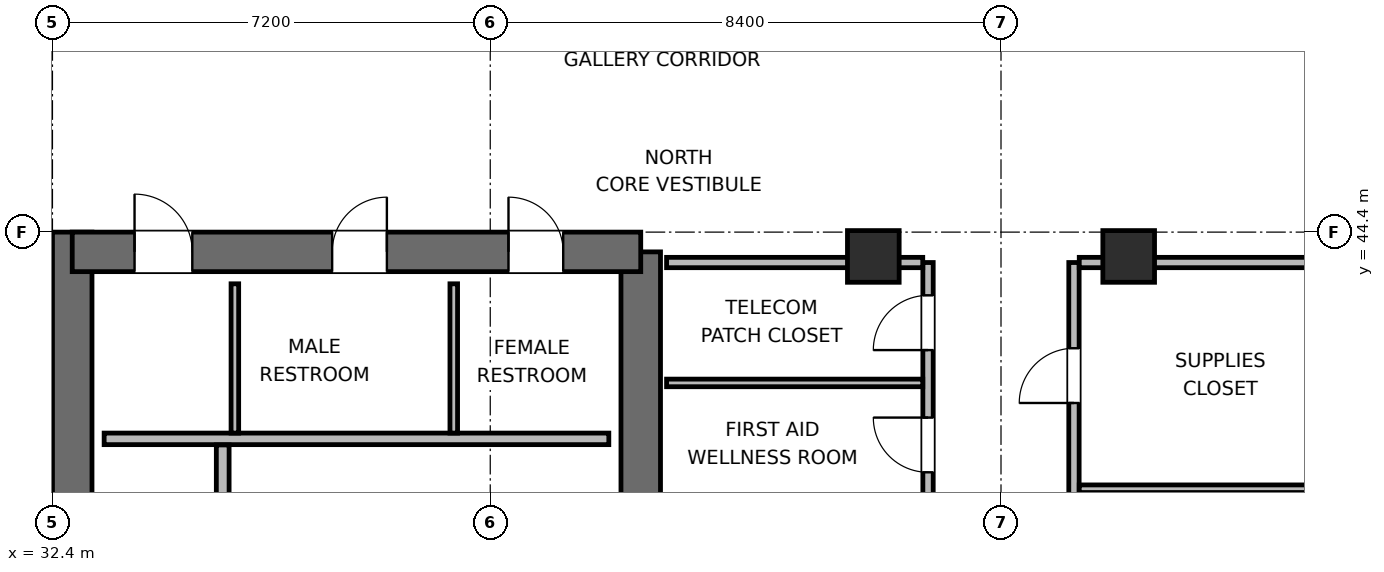
"""IFC4 building model, lengths in metres.
Left out: names, types, materials, properties, quantities, classifications, styles, units other than length and angle.
Written with IfcOpenShell. Run it as: python <this file> out.ifc"""

import sys

from ifc_helpers import new_model, si_unit, direction, frame, frame_2d, origin, origin_2d, place, context, subcontext, project, spatial, rectangle, extrude, element, fill, save


model = new_model("IFC4")
c1 = context("Model", 3, precision=1e-05, world=origin(), true_north=direction((0.0, 1.0)))
c2 = subcontext(c1, "Body", "Model", "MODEL_VIEW")
j1 = project(units=[si_unit("LENGTHUNIT", "METRE"), si_unit("PLANEANGLEUNIT", "RADIAN")], contexts=[c1])
p1 = place(None, origin())
s1 = spatial("IfcSite", under=j1, at=p1, CompositionType="ELEMENT")
p2 = place(p1, origin())
s2 = spatial("IfcBuilding", under=s1, at=p2, CompositionType="ELEMENT")
p3 = place(p2, frame((0.0, 0.0, 219.3)))
s3 = spatial("IfcBuildingStorey", under=s2, at=p3, CompositionType="ELEMENT", Elevation=219.3)
p4 = place(p3, frame((32.725, 27.6, 0.0), z_axis=(0.0, 0.0, 1.0), x_axis=(0.0, 1.0, 0.0)))
e1 = element("IfcWall", 1, at=p4, inside=s3, PredefinedType="SHEAR", context=c2, shape_type="SweptSolid", body=[
    extrude(rectangle(XDim=16.8, YDim=0.65, at=frame_2d((8.4, 0.0))), origin(), (0.0, 0.0, 1.0), 3.9),
])
p5 = place(p3, frame((42.075, 37.8, 0.0), z_axis=(0.0, 0.0, 1.0), x_axis=(0.0, 1.0, 0.0)))
e2 = element("IfcWall", 2, at=p5, inside=s3, PredefinedType="SHEAR", context=c2, shape_type="SweptSolid", body=[
    extrude(rectangle(XDim=6.275, YDim=0.65, at=frame_2d((3.137, 0.0))), origin(), (0.0, 0.0, 1.0), 3.9),
])
p6 = place(p3, frame((32.725, 44.075, 0.0), z_axis=(0.0, 0.0, 1.0), x_axis=(1.0, 0.0, 0.0)))
e3 = element("IfcWall", 3, at=p6, inside=s3, PredefinedType="SHEAR", context=c2, shape_type="SweptSolid", body=[
    extrude(rectangle(XDim=9.35, YDim=0.65, at=frame_2d((4.675, 0.0))), origin(), (0.0, 0.0, 1.0), 3.9),
])
p7 = place(p6, frame((1.025, 0.0, 0.0)))
e4 = element("IfcOpeningElement", 4, at=p7, cuts=e3, PredefinedType="OPENING", context=c2, shape_type="SweptSolid", body=[
    extrude(rectangle(XDim=0.95, YDim=2.04, at=frame_2d((0.475, 1.02))), frame((0.0, 0.335, 0.0), z_axis=(0.0, -1.0, 0.0), x_axis=(1.0, 0.0, 0.0)), (0.0, 0.0, 1.0), 0.67),
])
p8 = place(p6, frame((4.275, 0.0, 0.0)))
e5 = element("IfcOpeningElement", 5, at=p8, cuts=e3, PredefinedType="OPENING", context=c2, shape_type="SweptSolid", body=[
    extrude(rectangle(XDim=0.9, YDim=2.02, at=frame_2d((0.45, 1.01))), frame((0.0, 0.335, 0.0), z_axis=(0.0, -1.0, 0.0), x_axis=(1.0, 0.0, 0.0)), (0.0, 0.0, 1.0), 0.67),
])
p9 = place(p6, frame((7.175, 0.0, 0.0)))
e6 = element("IfcOpeningElement", 6, at=p9, cuts=e3, PredefinedType="OPENING", context=c2, shape_type="SweptSolid", body=[
    extrude(rectangle(XDim=0.9, YDim=2.02, at=frame_2d((0.45, 1.01))), frame((0.0, 0.335, 0.0), z_axis=(0.0, -1.0, 0.0), x_axis=(1.0, 0.0, 0.0)), (0.0, 0.0, 1.0), 0.67),
])
for number, where, z_axis, x_axis in (
    (7, (45.9, 44.0, 0.0), (0.0, 0.0, 1.0), (1.0, 0.0, 0.0)),
    (8, (50.1, 44.0, 0.0), (0.0, 0.0, 1.0), (1.0, 0.0, 0.0)),
):
    element("IfcColumn", number, at=place(p3, frame(where, z_axis=z_axis, x_axis=x_axis)), inside=s3, PredefinedType="COLUMN", context=c2, shape_type="SweptSolid", body=[
        extrude(rectangle(XDim=0.85, YDim=0.85, at=origin_2d()), origin(), (0.0, 0.0, 1.0), 3.9),
    ])
p10 = place(p3, frame((33.25, 41.0, 0.0), z_axis=(0.0, 0.0, 1.0), x_axis=(1.0, 0.0, 0.0)))
e9 = element("IfcWall", 9, at=p10, inside=s3, PredefinedType="PLUMBINGWALL", context=c2, shape_type="SweptSolid", body=[
    extrude(rectangle(XDim=8.3, YDim=0.19, at=frame_2d((4.15, 0.0))), origin(), (0.0, 0.0, 1.0), 3.68),
])
for number, where, z_axis, x_axis in (
    (10, (35.4, 41.095, 0.0), (0.0, 0.0, 1.0), (0.0, 1.0, 0.0)),
    (11, (39.0, 41.095, 0.0), (0.0, 0.0, 1.0), (0.0, 1.0, 0.0)),
):
    element("IfcWall", number, at=place(p3, frame(where, z_axis=z_axis, x_axis=x_axis)), inside=s3, PredefinedType="PARTITIONING", context=c2, shape_type="SweptSolid", body=[
        extrude(rectangle(XDim=2.455, YDim=0.125, at=frame_2d((1.228, 0.0))), origin(), (0.0, 0.0, 1.0), 3.68),
    ])
p11 = place(p3, frame((35.2, 39.58, 0.0), z_axis=(0.0, 0.0, 1.0), x_axis=(0.0, 1.0, 0.0)))
e12 = element("IfcWall", 12, at=p11, inside=s3, PredefinedType="PARTITIONING", context=c2, shape_type="SweptSolid", body=[
    extrude(rectangle(XDim=1.32, YDim=0.21, at=frame_2d((0.66, 0.0))), origin(), (0.0, 0.0, 1.0), 3.68),
])
p12 = place(p3, frame((46.8, 37.9, 0.0), z_axis=(0.0, 0.0, 1.0), x_axis=(0.0, 1.0, 0.0)))
e13 = element("IfcWall", 13, at=p12, inside=s3, PredefinedType="PARTITIONING", context=c2, shape_type="SweptSolid", body=[
    extrude(rectangle(XDim=6.0, YDim=0.17, at=frame_2d((3.0, 0.0))), origin(), (0.0, 0.0, 1.0), 3.68),
])
p13 = place(p12, frame((0.54, 0.0, 0.0)))
e14 = element("IfcOpeningElement", 14, at=p13, cuts=e13, PredefinedType="OPENING", context=c2, shape_type="SweptSolid", body=[
    extrude(rectangle(XDim=0.9, YDim=2.02, at=frame_2d((0.45, 1.01))), frame((0.0, 0.095, 0.0), z_axis=(0.0, -1.0, 0.0), x_axis=(1.0, 0.0, 0.0)), (0.0, 0.0, 1.0), 0.19),
])
p14 = place(p12, frame((2.55, 0.0, 0.0)))
e15 = element("IfcOpeningElement", 15, at=p14, cuts=e13, PredefinedType="OPENING", context=c2, shape_type="SweptSolid", body=[
    extrude(rectangle(XDim=0.9, YDim=2.02, at=frame_2d((0.45, 1.01))), frame((0.0, 0.095, 0.0), z_axis=(0.0, -1.0, 0.0), x_axis=(1.0, 0.0, 0.0)), (0.0, 0.0, 1.0), 0.19),
])
p15 = place(p12, frame((4.56, 0.0, 0.0)))
e16 = element("IfcOpeningElement", 16, at=p15, cuts=e13, PredefinedType="OPENING", context=c2, shape_type="SweptSolid", body=[
    extrude(rectangle(XDim=0.9, YDim=2.02, at=frame_2d((0.45, 1.01))), frame((0.0, 0.095, 0.0), z_axis=(0.0, -1.0, 0.0), x_axis=(1.0, 0.0, 0.0)), (0.0, 0.0, 1.0), 0.19),
])
p16 = place(p3, frame((42.5, 43.9, 0.0), z_axis=(0.0, 0.0, 1.0), x_axis=(1.0, 0.0, 0.0)))
e17 = element("IfcWall", 17, at=p16, inside=s3, PredefinedType="PARTITIONING", context=c2, shape_type="SweptSolid", body=[
    extrude(rectangle(XDim=4.213, YDim=0.17, at=frame_2d((2.106, 0.0))), origin(), (0.0, 0.0, 1.0), 2.765),
])
p17 = place(p3, frame((42.5, 41.92, 0.0), z_axis=(0.0, 0.0, 1.0), x_axis=(1.0, 0.0, 0.0)))
e18 = element("IfcWall", 18, at=p17, inside=s3, PredefinedType="PARTITIONING", context=c2, shape_type="SweptSolid", body=[
    extrude(rectangle(XDim=4.213, YDim=0.125, at=frame_2d((2.106, 0.0))), origin(), (0.0, 0.0, 1.0), 3.68),
])
p18 = place(p3, frame((49.2, 37.9, 0.0), z_axis=(0.0, 0.0, 1.0), x_axis=(0.0, 1.0, 0.0)))
e19 = element("IfcWall", 19, at=p18, inside=s3, PredefinedType="PARTITIONING", context=c2, shape_type="SweptSolid", body=[
    extrude(rectangle(XDim=6.0, YDim=0.17, at=frame_2d((3.0, 0.0))), origin(), (0.0, 0.0, 1.0), 3.68),
])
p19 = place(p18, frame((0.69, 0.0, 0.0)))
e20 = element("IfcOpeningElement", 20, at=p19, cuts=e19, PredefinedType="OPENING", context=c2, shape_type="SweptSolid", body=[
    extrude(rectangle(XDim=0.9, YDim=2.02, at=frame_2d((0.45, 1.01))), frame((0.0, 0.095, 0.0), z_axis=(0.0, -1.0, 0.0), x_axis=(1.0, 0.0, 0.0)), (0.0, 0.0, 1.0), 0.19),
])
p20 = place(p18, frame((3.69, 0.0, 0.0)))
e21 = element("IfcOpeningElement", 21, at=p20, cuts=e19, PredefinedType="OPENING", context=c2, shape_type="SweptSolid", body=[
    extrude(rectangle(XDim=0.9, YDim=2.02, at=frame_2d((0.45, 1.01))), frame((0.0, 0.095, 0.0), z_axis=(0.0, -1.0, 0.0), x_axis=(1.0, 0.0, 0.0)), (0.0, 0.0, 1.0), 0.19),
])
p21 = place(p3, frame((49.287, 43.9, 0.0), z_axis=(0.0, 0.0, 1.0), x_axis=(1.0, 0.0, 0.0)))
e22 = element("IfcWall", 22, at=p21, inside=s3, PredefinedType="PARTITIONING", context=c2, shape_type="SweptSolid", body=[
    extrude(rectangle(XDim=4.113, YDim=0.17, at=frame_2d((2.056, 0.0))), origin(), (0.0, 0.0, 1.0), 2.765),
])
p22 = place(p3, frame((49.287, 40.18, 0.0), z_axis=(0.0, 0.0, 1.0), x_axis=(1.0, 0.0, 0.0)))
e23 = element("IfcWall", 23, at=p22, inside=s3, PredefinedType="PARTITIONING", context=c2, shape_type="SweptSolid", body=[
    extrude(rectangle(XDim=4.113, YDim=0.125, at=frame_2d((2.056, 0.0))), origin(), (0.0, 0.0, 1.0), 3.68),
])
p23 = place(p7, origin())
e24 = element("IfcDoor", 24, at=p23, inside=s3, OperationType="SINGLE_SWING_LEFT", PredefinedType="DOOR", context=c2, shape_type="SweptSolid", body=[
    extrude(rectangle(XDim=0.95, YDim=2.04, at=frame_2d((0.475, 1.02))), frame((0.0, 0.025, 0.0), z_axis=(0.0, -1.0, 0.0), x_axis=(1.0, 0.0, 0.0)), (0.0, 0.0, 1.0), 0.05),
])
fill(e4, e24)
p24 = place(p8, origin())
e25 = element("IfcDoor", 25, at=p24, inside=s3, OperationType="SINGLE_SWING_RIGHT", PredefinedType="DOOR", context=c2, shape_type="SweptSolid", body=[
    extrude(rectangle(XDim=0.9, YDim=2.02, at=frame_2d((0.45, 1.01))), frame((0.0, 0.025, 0.0), z_axis=(0.0, -1.0, 0.0), x_axis=(1.0, 0.0, 0.0)), (0.0, 0.0, 1.0), 0.05),
])
fill(e5, e25)
p25 = place(p9, origin())
e26 = element("IfcDoor", 26, at=p25, inside=s3, OperationType="SINGLE_SWING_LEFT", PredefinedType="DOOR", context=c2, shape_type="SweptSolid", body=[
    extrude(rectangle(XDim=0.9, YDim=2.02, at=frame_2d((0.45, 1.01))), frame((0.0, 0.025, 0.0), z_axis=(0.0, -1.0, 0.0), x_axis=(1.0, 0.0, 0.0)), (0.0, 0.0, 1.0), 0.05),
])
fill(e6, e26)
p26 = place(p14, origin())
e27 = element("IfcDoor", 27, at=p26, inside=s3, OperationType="SINGLE_SWING_RIGHT", PredefinedType="DOOR", context=c2, shape_type="SweptSolid", body=[
    extrude(rectangle(XDim=0.9, YDim=2.02, at=frame_2d((0.45, 1.01))), frame((0.0, 0.025, 0.0), z_axis=(0.0, -1.0, 0.0), x_axis=(1.0, 0.0, 0.0)), (0.0, 0.0, 1.0), 0.05),
])
fill(e15, e27)
p27 = place(p15, origin())
e28 = element("IfcDoor", 28, at=p27, inside=s3, OperationType="SINGLE_SWING_LEFT", PredefinedType="DOOR", context=c2, shape_type="SweptSolid", body=[
    extrude(rectangle(XDim=0.9, YDim=2.02, at=frame_2d((0.45, 1.01))), frame((0.0, 0.025, 0.0), z_axis=(0.0, -1.0, 0.0), x_axis=(1.0, 0.0, 0.0)), (0.0, 0.0, 1.0), 0.05),
])
fill(e16, e28)
p28 = place(p20, origin())
e29 = element("IfcDoor", 29, at=p28, inside=s3, OperationType="SINGLE_SWING_LEFT", PredefinedType="DOOR", context=c2, shape_type="SweptSolid", body=[
    extrude(rectangle(XDim=0.9, YDim=2.02, at=frame_2d((0.45, 1.01))), frame((0.0, 0.025, 0.0), z_axis=(0.0, -1.0, 0.0), x_axis=(1.0, 0.0, 0.0)), (0.0, 0.0, 1.0), 0.05),
])
fill(e21, e29)
save(model, sys.argv[1])
